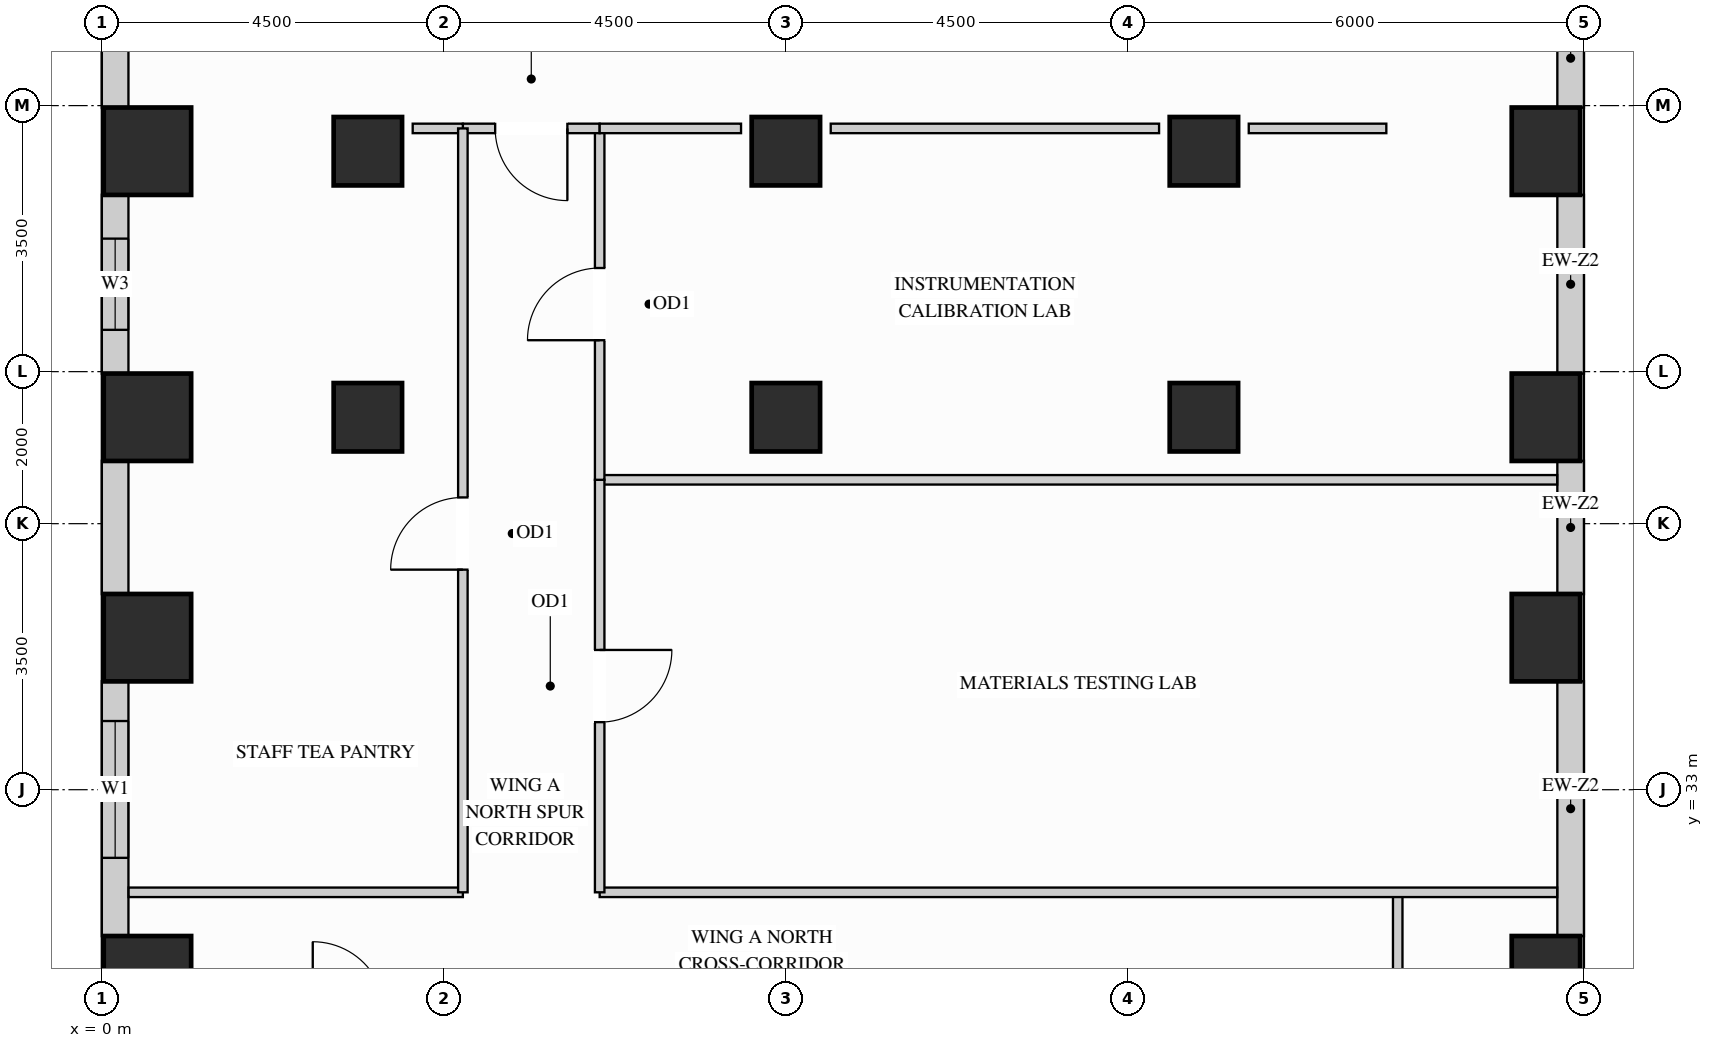
"""IFC4 building model, lengths in metres.
Left out: names, types, materials, properties, quantities, classifications, styles, units other than length and angle.
Written with IfcOpenShell. Run it as: python <this file> out.ifc"""

import sys

from ifc_helpers import new_model, si_unit, direction, frame, frame_2d, origin, origin_2d, place, context, subcontext, project, spatial, rectangle, extrude, source, transform, mapped, element, fill, save


model = new_model("IFC4")
c1 = context("Model", 3, precision=1e-05, world=origin(), true_north=direction((0.0, 1.0)))
c2 = subcontext(c1, "Body", "Model", "MODEL_VIEW")
j1 = project(units=[si_unit("LENGTHUNIT", "METRE"), si_unit("PLANEANGLEUNIT", "RADIAN")], contexts=[c1])
p1 = place(None, origin())
s1 = spatial("IfcSite", under=j1, at=p1, CompositionType="ELEMENT")
p2 = place(p1, origin())
s2 = spatial("IfcBuilding", under=s1, at=p2, CompositionType="ELEMENT")
p3 = place(p2, frame((0.0, 0.0, 95.4)))
s3 = spatial("IfcBuildingStorey", under=s2, at=p3, CompositionType="ELEMENT", Elevation=95.4)
m1 = source(origin(), c2, "Body", "SweptSolid", [
    extrude(rectangle(XDim=0.9, YDim=0.9, at=origin_2d()), origin(), (0.0, 0.0, 1.0), 3.38),
])
for number, where, z_axis, x_axis in (
    (1, (14.5, 37.9, 0.0), (0.0, 0.0, 1.0), (1.0, 0.0, 0.0)),
    (2, (14.5, 41.4, 0.0), (0.0, 0.0, 1.0), (1.0, 0.0, 0.0)),
    (3, (3.5, 37.9, 0.0), (0.0, 0.0, 1.0), (1.0, 0.0, 0.0)),
    (4, (3.5, 41.4, 0.0), (0.0, 0.0, 1.0), (1.0, 0.0, 0.0)),
    (5, (9.0, 37.9, 0.0), (0.0, 0.0, 1.0), (1.0, 0.0, 0.0)),
    (6, (9.0, 41.4, 0.0), (0.0, 0.0, 1.0), (1.0, 0.0, 0.0)),
):
    element("IfcColumn", number, at=place(p3, frame(where, z_axis=z_axis, x_axis=x_axis)), inside=s3, PredefinedType="COLUMN", context=c2, shape_type="MappedRepresentation", body=[
        mapped(m1, transform((0.0, 0.0, 0.0), x_axis=(1.0, 0.0, 0.0), y_axis=(0.0, 1.0, 0.0), z_axis=(0.0, 0.0, 1.0))),
    ])
m2 = source(origin(), c2, "Body", "SweptSolid", [
    extrude(rectangle(XDim=0.9, YDim=1.15, at=origin_2d()), origin(), (0.0, 0.0, 1.0), 3.38),
])
for number, where, z_axis, x_axis in (
    (7, (19.0, 30.5, 0.0), (0.0, 0.0, 1.0), (1.0, 0.0, 0.0)),
    (8, (19.0, 35.0, 0.0), (0.0, 0.0, 1.0), (1.0, 0.0, 0.0)),
    (9, (19.0, 37.9, 0.0), (0.0, 0.0, 1.0), (1.0, 0.0, 0.0)),
    (10, (19.0, 41.4, 0.0), (0.0, 0.0, 1.0), (1.0, 0.0, 0.0)),
):
    element("IfcColumn", number, at=place(p3, frame(where, z_axis=z_axis, x_axis=x_axis)), inside=s3, PredefinedType="COLUMN", context=c2, shape_type="MappedRepresentation", body=[
        mapped(m2, transform((0.0, 0.0, 0.0), x_axis=(1.0, 0.0, 0.0), y_axis=(0.0, 1.0, 0.0), z_axis=(0.0, 0.0, 1.0))),
    ])
m3 = source(origin(), c2, "Body", "SweptSolid", [
    extrude(rectangle(XDim=1.15, YDim=1.15, at=origin_2d()), origin(), (0.0, 0.0, 1.0), 3.38),
])
for number, where, z_axis, x_axis in (
    (11, (0.6, 30.5, 0.0), (0.0, 0.0, 1.0), (1.0, 0.0, 0.0)),
    (12, (0.6, 35.0, 0.0), (0.0, 0.0, 1.0), (1.0, 0.0, 0.0)),
    (13, (0.6, 37.9, 0.0), (0.0, 0.0, 1.0), (1.0, 0.0, 0.0)),
    (14, (0.6, 41.4, 0.0), (0.0, 0.0, 1.0), (1.0, 0.0, 0.0)),
):
    element("IfcColumn", number, at=place(p3, frame(where, z_axis=z_axis, x_axis=x_axis)), inside=s3, PredefinedType="COLUMN", context=c2, shape_type="MappedRepresentation", body=[
        mapped(m3, transform((0.0, 0.0, 0.0), x_axis=(1.0, 0.0, 0.0), y_axis=(0.0, 1.0, 0.0), z_axis=(0.0, 0.0, 1.0))),
    ])
m4 = source(origin(), c2, "Body", "SweptSolid", [
    extrude(rectangle(XDim=3.354, YDim=0.35, at=frame_2d((1.677, 0.0))), origin(), (0.0, 0.0, 1.0), 2.519),
])
p4 = place(p3, frame((19.325, 31.073, 0.0), z_axis=(0.0, 0.0, 1.0), x_axis=(0.0, 1.0, 0.0)))
e15 = element("IfcWall", 15, at=p4, inside=s3, PredefinedType="SOLIDWALL", context=c2, shape_type="MappedRepresentation", body=[
    mapped(m4, transform((0.0, 0.0, 0.0), x_axis=(1.0, 0.0, 0.0), y_axis=(0.0, 1.0, 0.0), z_axis=(0.0, 0.0, 1.0))),
])
m5 = source(origin(), c2, "Body", "SweptSolid", [
    extrude(rectangle(XDim=1.754, YDim=0.35, at=frame_2d((0.877, 0.0))), origin(), (0.0, 0.0, 1.0), 2.519),
])
p5 = place(p3, frame((19.325, 35.573, 0.0), z_axis=(0.0, 0.0, 1.0), x_axis=(0.0, 1.0, 0.0)))
e16 = element("IfcWall", 16, at=p5, inside=s3, PredefinedType="SOLIDWALL", context=c2, shape_type="MappedRepresentation", body=[
    mapped(m5, transform((0.0, 0.0, 0.0), x_axis=(1.0, 0.0, 0.0), y_axis=(0.0, 1.0, 0.0), z_axis=(0.0, 0.0, 1.0))),
])
m6 = source(origin(), c2, "Body", "SweptSolid", [
    extrude(rectangle(XDim=2.354, YDim=0.35, at=frame_2d((1.177, 0.0))), origin(), (0.0, 0.0, 1.0), 2.519),
])
p6 = place(p3, frame((19.325, 38.473, 0.0), z_axis=(0.0, 0.0, 1.0), x_axis=(0.0, 1.0, 0.0)))
e17 = element("IfcWall", 17, at=p6, inside=s3, PredefinedType="SOLIDWALL", context=c2, shape_type="MappedRepresentation", body=[
    mapped(m6, transform((0.0, 0.0, 0.0), x_axis=(1.0, 0.0, 0.0), y_axis=(0.0, 1.0, 0.0), z_axis=(0.0, 0.0, 1.0))),
])
m7 = source(origin(), c2, "Body", "SweptSolid", [
    extrude(rectangle(XDim=1.179, YDim=0.35, at=frame_2d((0.59, 0.0))), origin(), (0.0, 0.0, 1.0), 3.365),
])
for number, where, z_axis, x_axis in (
    (18, (19.325, 41.973, 0.0), (0.0, 0.0, 1.0), (0.0, 1.0, 0.0)),
    (19, (0.175, 43.152, 0.0), (0.0, 0.0, 1.0), (0.0, -1.0, 0.0)),
):
    element("IfcWall", number, at=place(p3, frame(where, z_axis=z_axis, x_axis=x_axis)), inside=s3, PredefinedType="SOLIDWALL", context=c2, shape_type="MappedRepresentation", body=[
        mapped(m7, transform((0.0, 0.0, 0.0), x_axis=(1.0, 0.0, 0.0), y_axis=(0.0, 1.0, 0.0), z_axis=(0.0, 0.0, 1.0))),
    ])
p7 = place(p3, frame((0.175, 40.827, 0.0), z_axis=(0.0, 0.0, 1.0), x_axis=(0.0, -1.0, 0.0)))
e20 = element("IfcWall", 20, at=p7, inside=s3, PredefinedType="SOLIDWALL", context=c2, shape_type="SweptSolid", body=[
    extrude(rectangle(XDim=2.354, YDim=0.35, at=frame_2d((1.177, 0.0))), origin(), (0.0, 0.0, 1.0), 3.365),
])
p8 = place(p7, frame((0.577, 0.0, 0.78)))
e21 = element("IfcOpeningElement", 21, at=p8, cuts=e20, PredefinedType="OPENING", context=c2, shape_type="SweptSolid", body=[
    extrude(rectangle(XDim=1.2, YDim=2.1, at=frame_2d((0.6, 1.05))), frame((0.0, 0.185, 0.0), z_axis=(0.0, -1.0, 0.0), x_axis=(1.0, 0.0, 0.0)), (0.0, 0.0, 1.0), 0.37),
])
m8 = source(origin(), c2, "Body", "SweptSolid", [
    extrude(rectangle(XDim=1.754, YDim=0.35, at=frame_2d((0.877, 0.0))), origin(), (0.0, 0.0, 1.0), 3.365),
])
p9 = place(p3, frame((0.175, 37.327, 0.0), z_axis=(0.0, 0.0, 1.0), x_axis=(0.0, -1.0, 0.0)))
e22 = element("IfcWall", 22, at=p9, inside=s3, PredefinedType="SOLIDWALL", context=c2, shape_type="MappedRepresentation", body=[
    mapped(m8, transform((0.0, 0.0, 0.0), x_axis=(1.0, 0.0, 0.0), y_axis=(0.0, 1.0, 0.0), z_axis=(0.0, 0.0, 1.0))),
])
p10 = place(p3, frame((0.175, 34.427, 0.0), z_axis=(0.0, 0.0, 1.0), x_axis=(0.0, -1.0, 0.0)))
e23 = element("IfcWall", 23, at=p10, inside=s3, PredefinedType="SOLIDWALL", context=c2, shape_type="SweptSolid", body=[
    extrude(rectangle(XDim=3.354, YDim=0.35, at=frame_2d((1.677, 0.0))), origin(), (0.0, 0.0, 1.0), 3.365),
])
p11 = place(p10, frame((0.523, 0.0, 0.78)))
e24 = element("IfcOpeningElement", 24, at=p11, cuts=e23, PredefinedType="OPENING", context=c2, shape_type="SweptSolid", body=[
    extrude(rectangle(XDim=1.8, YDim=2.1, at=frame_2d((0.9, 1.05))), frame((0.0, 0.185, 0.0), z_axis=(0.0, -1.0, 0.0), x_axis=(1.0, 0.0, 0.0)), (0.0, 0.0, 1.0), 0.37),
])
p12 = place(p3, frame((17.05, 26.05, 0.0), z_axis=(0.0, 0.0, 1.0), x_axis=(0.0, 1.0, 0.0)))
e25 = element("IfcWall", 25, at=p12, inside=s3, PredefinedType="PARTITIONING", context=c2, shape_type="SweptSolid", body=[
    extrude(rectangle(XDim=5.6, YDim=0.125, at=frame_2d((2.8, 0.0))), origin(), (0.0, 0.0, 1.0), 3.365),
])
p13 = place(p12, frame((2.325, 0.0, 0.0)))
e26 = element("IfcOpeningElement", 26, at=p13, cuts=e25, PredefinedType="OPENING", context=c2, shape_type="SweptSolid", body=[
    extrude(rectangle(XDim=0.95, YDim=2.15, at=frame_2d((0.475, 1.075))), frame((0.0, 0.073, 0.0), z_axis=(0.0, -1.0, 0.0), x_axis=(1.0, 0.0, 0.0)), (0.0, 0.0, 1.0), 0.145),
])
m9 = source(origin(), c2, "Body", "SweptSolid", [
    extrude(rectangle(XDim=12.598, YDim=0.125, at=frame_2d((6.299, 0.0))), origin(), (0.0, 0.0, 1.0), 3.365),
])
p14 = place(p3, frame((6.55, 37.077, 0.0), z_axis=(0.0, 0.0, 1.0), x_axis=(1.0, 0.0, 0.0)))
e27 = element("IfcWall", 27, at=p14, inside=s3, PredefinedType="PARTITIONING", context=c2, shape_type="MappedRepresentation", body=[
    mapped(m9, transform((0.0, 0.0, 0.0), x_axis=(1.0, 0.0, 0.0), y_axis=(0.0, 1.0, 0.0), z_axis=(0.0, 0.0, 1.0))),
])
m10 = source(origin(), c2, "Body", "SweptSolid", [
    extrude(rectangle(XDim=12.598, YDim=0.125, at=frame_2d((6.299, 0.0))), origin(), (0.0, 0.0, 1.0), 2.828),
])
p15 = place(p3, frame((6.55, 31.65, 0.0), z_axis=(0.0, 0.0, 1.0), x_axis=(1.0, 0.0, 0.0)))
e28 = element("IfcWall", 28, at=p15, inside=s3, PredefinedType="PARTITIONING", context=c2, shape_type="MappedRepresentation", body=[
    mapped(m10, transform((0.0, 0.0, 0.0), x_axis=(1.0, 0.0, 0.0), y_axis=(0.0, 1.0, 0.0), z_axis=(0.0, 0.0, 1.0))),
])
m11 = source(origin(), c2, "Body", "SweptSolid", [
    extrude(rectangle(XDim=4.398, YDim=0.125, at=frame_2d((2.199, 0.0))), origin(), (0.0, 0.0, 1.0), 2.828),
])
p16 = place(p3, frame((0.352, 31.65, 0.0), z_axis=(0.0, 0.0, 1.0), x_axis=(1.0, 0.0, 0.0)))
e29 = element("IfcWall", 29, at=p16, inside=s3, PredefinedType="PARTITIONING", context=c2, shape_type="MappedRepresentation", body=[
    mapped(m11, transform((0.0, 0.0, 0.0), x_axis=(1.0, 0.0, 0.0), y_axis=(0.0, 1.0, 0.0), z_axis=(0.0, 0.0, 1.0))),
])
p17 = place(p3, frame((6.55, 31.65, 0.0), z_axis=(0.0, 0.0, 1.0), x_axis=(0.0, 1.0, 0.0)))
e30 = element("IfcWall", 30, at=p17, inside=s3, PredefinedType="PARTITIONING", context=c2, shape_type="SweptSolid", body=[
    extrude(rectangle(XDim=5.427, YDim=0.125, at=frame_2d((2.713, 0.0))), origin(), (0.0, 0.0, 1.0), 3.365),
])
p18 = place(p17, frame((2.239, 0.0, 0.0)))
e31 = element("IfcOpeningElement", 31, at=p18, cuts=e30, PredefinedType="OPENING", context=c2, shape_type="SweptSolid", body=[
    extrude(rectangle(XDim=0.95, YDim=2.15, at=frame_2d((0.475, 1.075))), frame((0.0, 0.073, 0.0), z_axis=(0.0, -1.0, 0.0), x_axis=(1.0, 0.0, 0.0)), (0.0, 0.0, 1.0), 0.145),
])
p19 = place(p3, frame((6.55, 37.077, 0.0), z_axis=(0.0, 0.0, 1.0), x_axis=(0.0, 1.0, 0.0)))
e32 = element("IfcWall", 32, at=p19, inside=s3, PredefinedType="PARTITIONING", context=c2, shape_type="SweptSolid", body=[
    extrude(rectangle(XDim=4.623, YDim=0.125, at=frame_2d((2.312, 0.0))), origin(), (0.0, 0.0, 1.0), 3.365),
])
p20 = place(p19, frame((1.836, 0.0, 0.0)))
e33 = element("IfcOpeningElement", 33, at=p20, cuts=e32, PredefinedType="OPENING", context=c2, shape_type="SweptSolid", body=[
    extrude(rectangle(XDim=0.95, YDim=2.15, at=frame_2d((0.475, 1.075))), frame((0.0, 0.073, 0.0), z_axis=(0.0, -1.0, 0.0), x_axis=(1.0, 0.0, 0.0)), (0.0, 0.0, 1.0), 0.145),
])
p21 = place(p3, frame((4.75, 41.7, 0.0), z_axis=(0.0, 0.0, 1.0), x_axis=(1.0, 0.0, 0.0)))
e34 = element("IfcWall", 34, at=p21, inside=s3, PredefinedType="PARTITIONING", context=c2, shape_type="SweptSolid", body=[
    extrude(rectangle(XDim=1.8, YDim=0.125, at=frame_2d((0.9, 0.0))), origin(), (0.0, 0.0, 1.0), 3.365),
])
p22 = place(p21, frame((0.425, 0.0, 0.0)))
e35 = element("IfcOpeningElement", 35, at=p22, cuts=e34, PredefinedType="OPENING", context=c2, shape_type="SweptSolid", body=[
    extrude(rectangle(XDim=0.95, YDim=2.15, at=frame_2d((0.475, 1.075))), frame((0.0, 0.073, 0.0), z_axis=(0.0, -1.0, 0.0), x_axis=(1.0, 0.0, 0.0)), (0.0, 0.0, 1.0), 0.145),
])
m12 = source(origin(), c2, "Body", "SweptSolid", [
    extrude(rectangle(XDim=1.86, YDim=0.125, at=frame_2d((0.93, 0.0))), origin(), (0.0, 0.0, 1.0), 3.365),
])
p23 = place(p3, frame((6.55, 41.7, 0.0), z_axis=(0.0, 0.0, 1.0), x_axis=(1.0, 0.0, 0.0)))
e36 = element("IfcWall", 36, at=p23, inside=s3, PredefinedType="PARTITIONING", context=c2, shape_type="MappedRepresentation", body=[
    mapped(m12, transform((0.0, 0.0, 0.0), x_axis=(1.0, 0.0, 0.0), y_axis=(0.0, 1.0, 0.0), z_axis=(0.0, 0.0, 1.0))),
])
m13 = source(origin(), c2, "Body", "SweptSolid", [
    extrude(rectangle(XDim=4.32, YDim=0.125, at=frame_2d((2.16, 0.0))), origin(), (0.0, 0.0, 1.0), 3.365),
])
p24 = place(p3, frame((9.59, 41.7, 0.0), z_axis=(0.0, 0.0, 1.0), x_axis=(1.0, 0.0, 0.0)))
e37 = element("IfcWall", 37, at=p24, inside=s3, PredefinedType="PARTITIONING", context=c2, shape_type="MappedRepresentation", body=[
    mapped(m13, transform((0.0, 0.0, 0.0), x_axis=(1.0, 0.0, 0.0), y_axis=(0.0, 1.0, 0.0), z_axis=(0.0, 0.0, 1.0))),
])
m14 = source(origin(), c2, "Body", "SweptSolid", [
    extrude(rectangle(XDim=1.81, YDim=0.125, at=frame_2d((0.905, 0.0))), origin(), (0.0, 0.0, 1.0), 3.365),
])
p25 = place(p3, frame((15.09, 41.7, 0.0), z_axis=(0.0, 0.0, 1.0), x_axis=(1.0, 0.0, 0.0)))
e38 = element("IfcWall", 38, at=p25, inside=s3, PredefinedType="PARTITIONING", context=c2, shape_type="MappedRepresentation", body=[
    mapped(m14, transform((0.0, 0.0, 0.0), x_axis=(1.0, 0.0, 0.0), y_axis=(0.0, 1.0, 0.0), z_axis=(0.0, 0.0, 1.0))),
])
m15 = source(origin(), c2, "Body", "SweptSolid", [
    extrude(rectangle(XDim=0.66, YDim=0.125, at=frame_2d((0.33, 0.0))), origin(), (0.0, 0.0, 1.0), 3.365),
])
p26 = place(p3, frame((4.09, 41.7, 0.0), z_axis=(0.0, 0.0, 1.0), x_axis=(1.0, 0.0, 0.0)))
e39 = element("IfcWall", 39, at=p26, inside=s3, PredefinedType="PARTITIONING", context=c2, shape_type="MappedRepresentation", body=[
    mapped(m15, transform((0.0, 0.0, 0.0), x_axis=(1.0, 0.0, 0.0), y_axis=(0.0, 1.0, 0.0), z_axis=(0.0, 0.0, 1.0))),
])
p27 = place(p3, frame((4.75, 31.65, 0.0), z_axis=(0.0, 0.0, 1.0), x_axis=(0.0, 1.0, 0.0)))
e40 = element("IfcWall", 40, at=p27, inside=s3, PredefinedType="PARTITIONING", context=c2, shape_type="SweptSolid", body=[
    extrude(rectangle(XDim=10.05, YDim=0.125, at=frame_2d((5.025, 0.0))), origin(), (0.0, 0.0, 1.0), 3.365),
])
p28 = place(p27, frame((4.245, 0.0, 0.0)))
e41 = element("IfcOpeningElement", 41, at=p28, cuts=e40, PredefinedType="OPENING", context=c2, shape_type="SweptSolid", body=[
    extrude(rectangle(XDim=0.95, YDim=2.15, at=frame_2d((0.475, 1.075))), frame((0.0, 0.073, 0.0), z_axis=(0.0, -1.0, 0.0), x_axis=(1.0, 0.0, 0.0)), (0.0, 0.0, 1.0), 0.145),
])
m16 = source(origin(), c2, "Body", "SweptSolid", [
    extrude(rectangle(XDim=0.95, YDim=2.15, at=frame_2d((0.475, 1.075))), frame((0.0, 0.025, 0.0), z_axis=(0.0, -1.0, 0.0), x_axis=(1.0, 0.0, 0.0)), (0.0, 0.0, 1.0), 0.05),
])
p29 = place(p18, origin())
e42 = element("IfcDoor", 42, at=p29, inside=s3, OperationType="SINGLE_SWING_RIGHT", PredefinedType="DOOR", context=c2, shape_type="MappedRepresentation", body=[
    mapped(m16, transform((0.0, 0.0, 0.0), x_axis=(1.0, 0.0, 0.0), y_axis=(0.0, 1.0, 0.0), z_axis=(0.0, 0.0, 1.0))),
])
fill(e31, e42)
p30 = place(p20, origin())
e43 = element("IfcDoor", 43, at=p30, inside=s3, OperationType="SINGLE_SWING_LEFT", PredefinedType="DOOR", context=c2, shape_type="MappedRepresentation", body=[
    mapped(m16, transform((0.0, 0.0, 0.0), x_axis=(1.0, 0.0, 0.0), y_axis=(0.0, 1.0, 0.0), z_axis=(0.0, 0.0, 1.0))),
])
fill(e33, e43)
p31 = place(p22, origin())
e44 = element("IfcDoor", 44, at=p31, inside=s3, OperationType="SINGLE_SWING_RIGHT", PredefinedType="DOOR", context=c2, shape_type="MappedRepresentation", body=[
    mapped(m16, transform((0.0, 0.0, 0.0), x_axis=(1.0, 0.0, 0.0), y_axis=(0.0, 1.0, 0.0), z_axis=(0.0, 0.0, 1.0))),
])
fill(e35, e44)
p32 = place(p28, origin())
e45 = element("IfcDoor", 45, at=p32, inside=s3, OperationType="SINGLE_SWING_LEFT", PredefinedType="DOOR", context=c2, shape_type="MappedRepresentation", body=[
    mapped(m16, transform((0.0, 0.0, 0.0), x_axis=(1.0, 0.0, 0.0), y_axis=(0.0, 1.0, 0.0), z_axis=(0.0, 0.0, 1.0))),
])
fill(e41, e45)
m17 = source(origin(), c2, "Body", "SweptSolid", [
    extrude(rectangle(XDim=1.8, YDim=2.1, at=frame_2d((0.9, 1.05))), frame((0.0, 0.03, 0.0), z_axis=(0.0, -1.0, 0.0), x_axis=(1.0, 0.0, 0.0)), (0.0, 0.0, 1.0), 0.06),
])
p33 = place(p11, origin())
e46 = element("IfcWindow", 46, at=p33, inside=s3, PartitioningType="SINGLE_PANEL", PredefinedType="WINDOW", context=c2, shape_type="MappedRepresentation", body=[
    mapped(m17, transform((0.0, 0.0, 0.0), x_axis=(1.0, 0.0, 0.0), y_axis=(0.0, 1.0, 0.0), z_axis=(0.0, 0.0, 1.0))),
])
fill(e24, e46)
m18 = source(origin(), c2, "Body", "SweptSolid", [
    extrude(rectangle(XDim=1.2, YDim=2.1, at=frame_2d((0.6, 1.05))), frame((0.0, 0.03, 0.0), z_axis=(0.0, -1.0, 0.0), x_axis=(1.0, 0.0, 0.0)), (0.0, 0.0, 1.0), 0.06),
])
p34 = place(p8, origin())
e47 = element("IfcWindow", 47, at=p34, inside=s3, PartitioningType="SINGLE_PANEL", PredefinedType="WINDOW", context=c2, shape_type="MappedRepresentation", body=[
    mapped(m18, transform((0.0, 0.0, 0.0), x_axis=(1.0, 0.0, 0.0), y_axis=(0.0, 1.0, 0.0), z_axis=(0.0, 0.0, 1.0))),
])
fill(e21, e47)
save(model, sys.argv[1])
